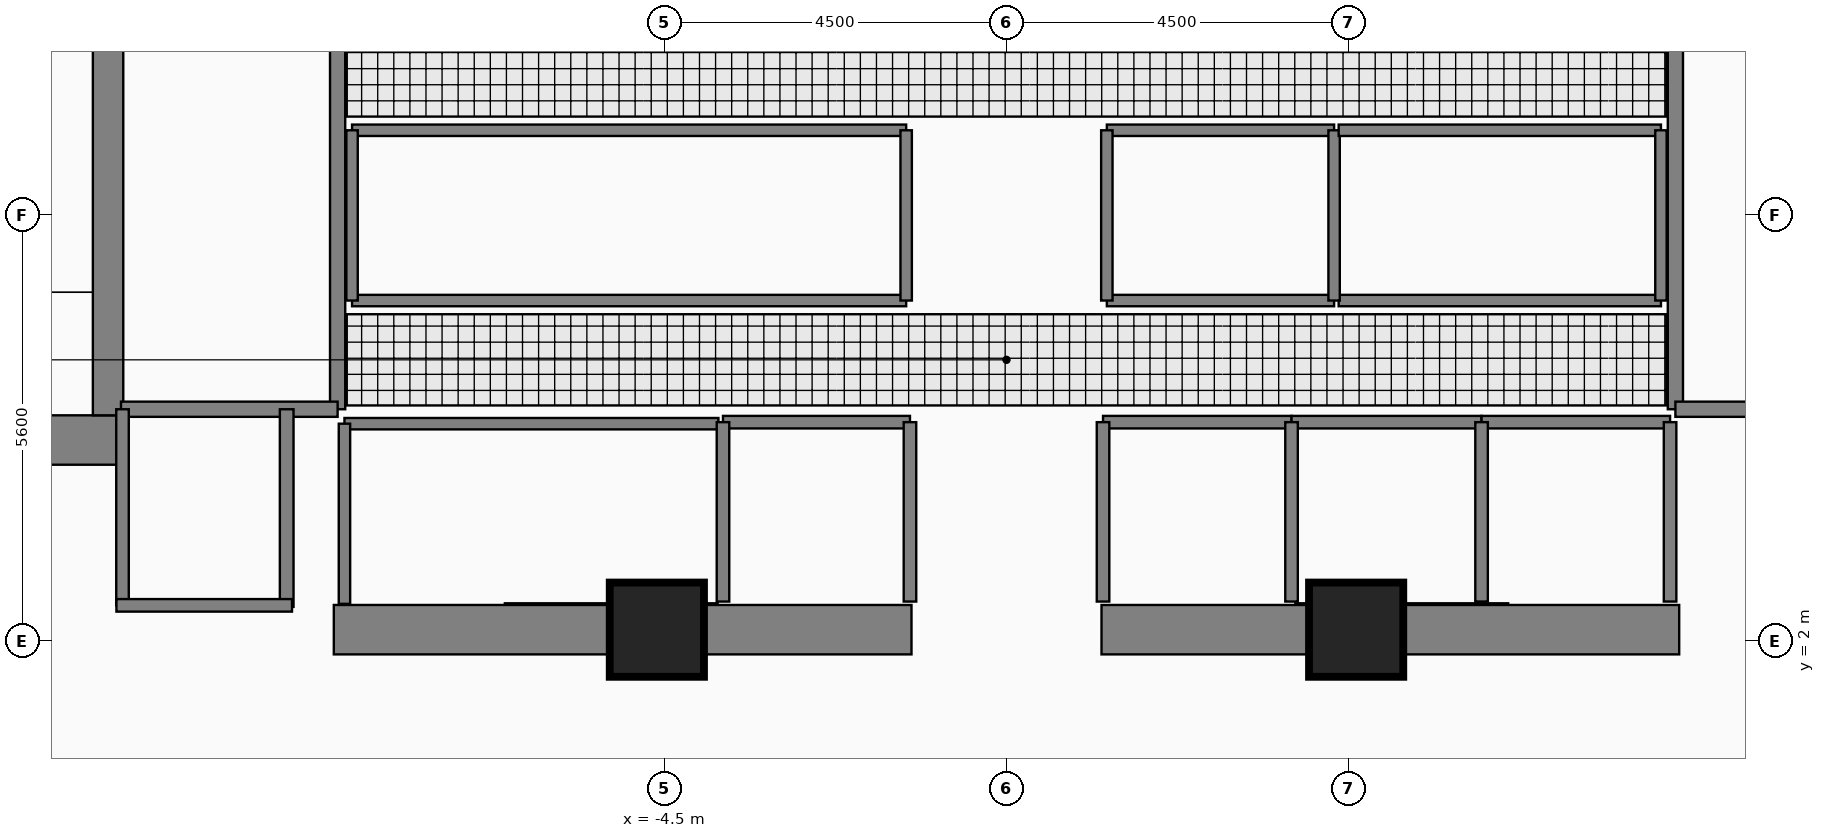
"""IFC4 building model, lengths in metres.
Left out: names, types, materials, properties, quantities, classifications, styles, units other than length and angle.
Written with IfcOpenShell. Run it as: python <this file> out.ifc"""

import sys

from ifc_helpers import new_model, si_unit, direction, frame, frame_2d, origin, origin_2d, place, context, subcontext, project, spatial, rectangle, extrude, element, fill, save


model = new_model("IFC4")
c1 = context("Model", 3, precision=1e-05, world=origin(), true_north=direction((0.0, 1.0)))
c2 = subcontext(c1, "Body", "Model", "MODEL_VIEW")
j1 = project(units=[si_unit("LENGTHUNIT", "METRE"), si_unit("PLANEANGLEUNIT", "RADIAN")], contexts=[c1])
p1 = place(None, origin())
s1 = spatial("IfcSite", under=j1, at=p1, CompositionType="ELEMENT")
p2 = place(p1, origin())
s2 = spatial("IfcBuilding", under=s1, at=p2, CompositionType="ELEMENT")
p3 = place(p2, frame((0.0, 0.0, 168.2)))
s3 = spatial("IfcBuildingStorey", under=s2, at=p3, CompositionType="ELEMENT", Elevation=168.2)
p4 = place(p3, frame((-16.06, 4.645, 0.0), z_axis=(0.0, 0.0, 1.0), x_axis=(1.0, 0.0, 0.0)))
e1 = element("IfcWall", 1, at=p4, inside=s3, PredefinedType="SHEAR", context=c2, shape_type="SweptSolid", body=[
    extrude(rectangle(XDim=4.46, YDim=0.65, at=frame_2d((2.23, 0.0))), origin(), (0.0, 0.0, 1.0), 4.41),
])
for number, where, z_axis, x_axis in (
    (2, (-8.85, 2.15, 0.0), (0.0, 0.0, 1.0), (1.0, 0.0, 0.0)),
    (3, (1.25, 2.15, 0.0), (0.0, 0.0, 1.0), (1.0, 0.0, 0.0)),
):
    element("IfcWall", number, at=place(p3, frame(where, z_axis=z_axis, x_axis=x_axis)), inside=s3, PredefinedType="SHEAR", context=c2, shape_type="SweptSolid", body=[
        extrude(rectangle(XDim=7.6, YDim=0.65, at=frame_2d((3.8, 0.0))), origin(), (0.0, 0.0, 1.0), 4.38),
    ])
p5 = place(p3, frame((-11.82, 4.97, 0.0), z_axis=(0.0, 0.0, 1.0), x_axis=(0.0, 1.0, 0.0)))
e4 = element("IfcWall", 4, at=p5, inside=s3, PredefinedType="SHEAR", context=c2, shape_type="SweptSolid", body=[
    extrude(rectangle(XDim=8.96, YDim=0.4, at=frame_2d((4.48, 0.0))), origin(), (0.0, 0.0, 1.0), 4.41),
])
p6 = place(p5, frame((0.31, 0.0, 0.0)))
e5 = element("IfcOpeningElement", 5, at=p6, cuts=e4, PredefinedType="OPENING", context=c2, shape_type="SweptSolid", body=[
    extrude(rectangle(XDim=1.12, YDim=2.22, at=frame_2d((0.56, 1.11))), frame((0.0, 0.21, 0.0), z_axis=(0.0, -1.0, 0.0), x_axis=(1.0, 0.0, 0.0)), (0.0, 0.0, 1.0), 0.42),
])
for number, where, z_axis, x_axis in (
    (6, (-4.6, 2.15, 0.0), (0.0, 0.0, 1.0), (1.0, 0.0, 0.0)),
    (7, (4.6, 2.15, 0.0), (0.0, 0.0, 1.0), (1.0, 0.0, 0.0)),
):
    element("IfcColumn", number, at=place(p3, frame(where, z_axis=z_axis, x_axis=x_axis)), inside=s3, PredefinedType="COLUMN", context=c2, shape_type="SweptSolid", body=[
        extrude(rectangle(XDim=1.2, YDim=1.2, at=origin_2d()), origin(), (0.0, 0.0, 1.0), 4.6),
    ])
p7 = place(p3, frame((-8.8, 5.05, 0.0), z_axis=(0.0, 0.0, 1.0), x_axis=(0.0, 1.0, 0.0)))
e8 = element("IfcWall", 8, at=p7, inside=s3, PredefinedType="PARTITIONING", context=c2, shape_type="SweptSolid", body=[
    extrude(rectangle(XDim=6.1, YDim=0.2, at=frame_2d((3.05, 0.0))), origin(), (0.0, 0.0, 1.0), 4.38),
])
p8 = place(p7, frame((0.25, 0.0, 0.0)))
e9 = element("IfcOpeningElement", 9, at=p8, cuts=e8, PredefinedType="OPENING", context=c2, shape_type="SweptSolid", body=[
    extrude(rectangle(XDim=1.1, YDim=2.2, at=frame_2d((0.55, 1.1))), frame((0.0, 0.11, 0.0), z_axis=(0.0, -1.0, 0.0), x_axis=(1.0, 0.0, 0.0)), (0.0, 0.0, 1.0), 0.22),
])
p9 = place(p7, frame((3.85, 0.0, 0.0)))
e10 = element("IfcOpeningElement", 10, at=p9, cuts=e8, PredefinedType="OPENING", context=c2, shape_type="SweptSolid", body=[
    extrude(rectangle(XDim=1.1, YDim=2.2, at=frame_2d((0.55, 1.1))), frame((0.0, 0.11, 0.0), z_axis=(0.0, -1.0, 0.0), x_axis=(1.0, 0.0, 0.0)), (0.0, 0.0, 1.0), 0.22),
])
p10 = place(p3, frame((8.8, 11.15, 0.0), z_axis=(0.0, 0.0, 1.0), x_axis=(0.0, -1.0, 0.0)))
e11 = element("IfcWall", 11, at=p10, inside=s3, PredefinedType="PARTITIONING", context=c2, shape_type="SweptSolid", body=[
    extrude(rectangle(XDim=6.1, YDim=0.2, at=frame_2d((3.05, 0.0))), origin(), (0.0, 0.0, 1.0), 4.38),
])
p11 = place(p10, frame((1.15, 0.0, 0.0)))
e12 = element("IfcOpeningElement", 12, at=p11, cuts=e11, PredefinedType="OPENING", context=c2, shape_type="SweptSolid", body=[
    extrude(rectangle(XDim=1.1, YDim=2.2, at=frame_2d((0.55, 1.1))), frame((0.0, 0.11, 0.0), z_axis=(0.0, -1.0, 0.0), x_axis=(1.0, 0.0, 0.0)), (0.0, 0.0, 1.0), 0.22),
])
p12 = place(p10, frame((4.75, 0.0, 0.0)))
e13 = element("IfcOpeningElement", 13, at=p12, cuts=e11, PredefinedType="OPENING", context=c2, shape_type="SweptSolid", body=[
    extrude(rectangle(XDim=1.1, YDim=2.2, at=frame_2d((0.55, 1.1))), frame((0.0, 0.11, 0.0), z_axis=(0.0, -1.0, 0.0), x_axis=(1.0, 0.0, 0.0)), (0.0, 0.0, 1.0), 0.22),
])
p13 = place(p3, frame((-3.73, 4.88, 0.0), z_axis=(0.0, 0.0, 1.0), x_axis=(1.0, 0.0, 0.0)))
e14 = element("IfcWall", 14, at=p13, inside=s3, PredefinedType="PARTITIONING", context=c2, shape_type="SweptSolid", body=[
    extrude(rectangle(XDim=2.46, YDim=0.165, at=frame_2d((1.23, 0.0))), origin(), (0.0, 0.0, 1.0), 4.38),
])
p14 = place(p13, frame((0.68, 0.0, 0.0)))
e15 = element("IfcOpeningElement", 15, at=p14, cuts=e14, PredefinedType="OPENING", context=c2, shape_type="SweptSolid", body=[
    extrude(rectangle(XDim=1.1, YDim=2.25, at=frame_2d((0.55, 1.125))), frame((0.0, 0.093, 0.0), z_axis=(0.0, -1.0, 0.0), x_axis=(1.0, 0.0, 0.0)), (0.0, 0.0, 1.0), 0.185),
])
p15 = place(p3, frame((1.27, 4.88, 0.0), z_axis=(0.0, 0.0, 1.0), x_axis=(1.0, 0.0, 0.0)))
e16 = element("IfcWall", 16, at=p15, inside=s3, PredefinedType="PARTITIONING", context=c2, shape_type="SweptSolid", body=[
    extrude(rectangle(XDim=2.48, YDim=0.165, at=frame_2d((1.24, 0.0))), origin(), (0.0, 0.0, 1.0), 4.38),
])
p16 = place(p15, frame((0.69, 0.0, 0.0)))
e17 = element("IfcOpeningElement", 17, at=p16, cuts=e16, PredefinedType="OPENING", context=c2, shape_type="SweptSolid", body=[
    extrude(rectangle(XDim=1.1, YDim=2.25, at=frame_2d((0.55, 1.125))), frame((0.0, 0.093, 0.0), z_axis=(0.0, -1.0, 0.0), x_axis=(1.0, 0.0, 0.0)), (0.0, 0.0, 1.0), 0.185),
])
p17 = place(p3, frame((3.75, 4.88, 0.0), z_axis=(0.0, 0.0, 1.0), x_axis=(1.0, 0.0, 0.0)))
e18 = element("IfcWall", 18, at=p17, inside=s3, PredefinedType="PARTITIONING", context=c2, shape_type="SweptSolid", body=[
    extrude(rectangle(XDim=2.5, YDim=0.165, at=frame_2d((1.25, 0.0))), origin(), (0.0, 0.0, 1.0), 4.38),
])
p18 = place(p17, frame((0.7, 0.0, 0.0)))
e19 = element("IfcOpeningElement", 19, at=p18, cuts=e18, PredefinedType="OPENING", context=c2, shape_type="SweptSolid", body=[
    extrude(rectangle(XDim=1.1, YDim=2.25, at=frame_2d((0.55, 1.125))), frame((0.0, 0.093, 0.0), z_axis=(0.0, -1.0, 0.0), x_axis=(1.0, 0.0, 0.0)), (0.0, 0.0, 1.0), 0.185),
])
p19 = place(p3, frame((6.25, 4.88, 0.0), z_axis=(0.0, 0.0, 1.0), x_axis=(1.0, 0.0, 0.0)))
e20 = element("IfcWall", 20, at=p19, inside=s3, PredefinedType="PARTITIONING", context=c2, shape_type="SweptSolid", body=[
    extrude(rectangle(XDim=2.48, YDim=0.165, at=frame_2d((1.24, 0.0))), origin(), (0.0, 0.0, 1.0), 4.38),
])
p20 = place(p19, frame((0.69, 0.0, 0.0)))
e21 = element("IfcOpeningElement", 21, at=p20, cuts=e20, PredefinedType="OPENING", context=c2, shape_type="SweptSolid", body=[
    extrude(rectangle(XDim=1.1, YDim=2.25, at=frame_2d((0.55, 1.125))), frame((0.0, 0.093, 0.0), z_axis=(0.0, -1.0, 0.0), x_axis=(1.0, 0.0, 0.0)), (0.0, 0.0, 1.0), 0.185),
])
p21 = place(p3, frame((-8.71, 4.86, 0.0), z_axis=(0.0, 0.0, 1.0), x_axis=(1.0, 0.0, 0.0)))
e22 = element("IfcWall", 22, at=p21, inside=s3, PredefinedType="PARTITIONING", context=c2, shape_type="SweptSolid", body=[
    extrude(rectangle(XDim=4.92, YDim=0.15, at=frame_2d((2.46, 0.0))), origin(), (0.0, 0.0, 1.0), 4.38),
])
p22 = place(p21, frame((2.01, 0.0, 0.0)))
e23 = element("IfcOpeningElement", 23, at=p22, cuts=e22, PredefinedType="OPENING", context=c2, shape_type="SweptSolid", body=[
    extrude(rectangle(XDim=0.9, YDim=2.15, at=frame_2d((0.45, 1.075))), frame((0.0, 0.085, 0.0), z_axis=(0.0, -1.0, 0.0), x_axis=(1.0, 0.0, 0.0)), (0.0, 0.0, 1.0), 0.17),
])
p23 = place(p3, frame((-8.61, 6.48, 0.0), z_axis=(0.0, 0.0, 1.0), x_axis=(1.0, 0.0, 0.0)))
e24 = element("IfcWall", 24, at=p23, inside=s3, PredefinedType="PARTITIONING", context=c2, shape_type="SweptSolid", body=[
    extrude(rectangle(XDim=7.29, YDim=0.15, at=frame_2d((3.645, 0.0))), origin(), (0.0, 0.0, 1.0), 4.38),
])
p24 = place(p23, frame((3.195, 0.0, 0.0)))
e25 = element("IfcOpeningElement", 25, at=p24, cuts=e24, PredefinedType="OPENING", context=c2, shape_type="SweptSolid", body=[
    extrude(rectangle(XDim=0.9, YDim=2.15, at=frame_2d((0.45, 1.075))), frame((0.0, 0.085, 0.0), z_axis=(0.0, -1.0, 0.0), x_axis=(1.0, 0.0, 0.0)), (0.0, 0.0, 1.0), 0.17),
])
p25 = place(p3, frame((1.32, 8.72, 0.0), z_axis=(0.0, 0.0, 1.0), x_axis=(1.0, 0.0, 0.0)))
e26 = element("IfcWall", 26, at=p25, inside=s3, PredefinedType="PARTITIONING", context=c2, shape_type="SweptSolid", body=[
    extrude(rectangle(XDim=2.99, YDim=0.15, at=frame_2d((1.495, 0.0))), origin(), (0.0, 0.0, 1.0), 4.38),
])
p26 = place(p25, frame((1.045, 0.0, 0.0)))
e27 = element("IfcOpeningElement", 27, at=p26, cuts=e26, PredefinedType="OPENING", context=c2, shape_type="SweptSolid", body=[
    extrude(rectangle(XDim=0.9, YDim=2.15, at=frame_2d((0.45, 1.075))), frame((0.0, 0.085, 0.0), z_axis=(0.0, -1.0, 0.0), x_axis=(1.0, 0.0, 0.0)), (0.0, 0.0, 1.0), 0.17),
])
p27 = place(p3, frame((4.37, 6.48, 0.0), z_axis=(0.0, 0.0, 1.0), x_axis=(1.0, 0.0, 0.0)))
e28 = element("IfcWall", 28, at=p27, inside=s3, PredefinedType="PARTITIONING", context=c2, shape_type="SweptSolid", body=[
    extrude(rectangle(XDim=4.24, YDim=0.15, at=frame_2d((2.12, 0.0))), origin(), (0.0, 0.0, 1.0), 4.38),
])
p28 = place(p27, frame((1.67, 0.0, 0.0)))
e29 = element("IfcOpeningElement", 29, at=p28, cuts=e28, PredefinedType="OPENING", context=c2, shape_type="SweptSolid", body=[
    extrude(rectangle(XDim=0.9, YDim=2.15, at=frame_2d((0.45, 1.075))), frame((0.0, 0.085, 0.0), z_axis=(0.0, -1.0, 0.0), x_axis=(1.0, 0.0, 0.0)), (0.0, 0.0, 1.0), 0.17),
])
for number, where, z_axis, x_axis in (
    (30, (-11.65, 5.05, 0.0), (0.0, 0.0, 1.0), (1.0, 0.0, 0.0)),
    (31, (8.8, 5.05, 0.0), (0.0, 0.0, 1.0), (1.0, 0.0, 0.0)),
):
    element("IfcWall", number, at=place(p3, frame(where, z_axis=z_axis, x_axis=x_axis)), inside=s3, PredefinedType="PARTITIONING", context=c2, shape_type="SweptSolid", body=[
        extrude(rectangle(XDim=2.85, YDim=0.2, at=frame_2d((1.425, 0.0))), origin(), (0.0, 0.0, 1.0), 4.38),
    ])
for number, where, z_axis, x_axis in (
    (32, (-3.73, 2.52, 0.0), (0.0, 0.0, 1.0), (0.0, 1.0, 0.0)),
    (33, (-1.27, 2.52, 0.0), (0.0, 0.0, 1.0), (0.0, 1.0, 0.0)),
    (34, (1.27, 2.52, 0.0), (0.0, 0.0, 1.0), (0.0, 1.0, 0.0)),
    (35, (3.75, 2.52, 0.0), (0.0, 0.0, 1.0), (0.0, 1.0, 0.0)),
    (36, (6.25, 2.52, 0.0), (0.0, 0.0, 1.0), (0.0, 1.0, 0.0)),
    (37, (8.73, 2.52, 0.0), (0.0, 0.0, 1.0), (0.0, 1.0, 0.0)),
):
    element("IfcWall", number, at=place(p3, frame(where, z_axis=z_axis, x_axis=x_axis)), inside=s3, PredefinedType="PARTITIONING", context=c2, shape_type="SweptSolid", body=[
        extrude(rectangle(XDim=2.36, YDim=0.165, at=frame_2d((1.18, 0.0))), origin(), (0.0, 0.0, 1.0), 4.38),
    ])
p29 = place(p3, frame((-8.71, 2.49, 0.0), z_axis=(0.0, 0.0, 1.0), x_axis=(0.0, 1.0, 0.0)))
e38 = element("IfcWall", 38, at=p29, inside=s3, PredefinedType="PARTITIONING", context=c2, shape_type="SweptSolid", body=[
    extrude(rectangle(XDim=2.37, YDim=0.15, at=frame_2d((1.185, 0.0))), origin(), (0.0, 0.0, 1.0), 4.38),
])
p30 = place(p3, frame((-9.47, 2.45, 0.0), z_axis=(0.0, 0.0, 1.0), x_axis=(0.0, 1.0, 0.0)))
e39 = element("IfcWall", 39, at=p30, inside=s3, PredefinedType="PARTITIONING", context=c2, shape_type="SweptSolid", body=[
    extrude(rectangle(XDim=2.6, YDim=0.18, at=frame_2d((1.3, 0.0))), origin(), (0.0, 0.0, 1.0), 4.38),
])
p31 = place(p3, frame((-11.63, 2.47, 0.0), z_axis=(0.0, 0.0, 1.0), x_axis=(0.0, 1.0, 0.0)))
e40 = element("IfcWall", 40, at=p31, inside=s3, PredefinedType="PARTITIONING", context=c2, shape_type="SweptSolid", body=[
    extrude(rectangle(XDim=2.58, YDim=0.165, at=frame_2d((1.29, 0.0))), origin(), (0.0, 0.0, 1.0), 4.38),
])
p32 = place(p3, frame((-11.71, 2.47, 0.0), z_axis=(0.0, 0.0, 1.0), x_axis=(1.0, 0.0, 0.0)))
e41 = element("IfcWall", 41, at=p32, inside=s3, PredefinedType="PARTITIONING", context=c2, shape_type="SweptSolid", body=[
    extrude(rectangle(XDim=2.31, YDim=0.165, at=frame_2d((1.155, 0.0))), origin(), (0.0, 0.0, 1.0), 3.28),
])
p33 = place(p3, frame((-8.61, 8.72, 0.0), z_axis=(0.0, 0.0, 1.0), x_axis=(1.0, 0.0, 0.0)))
e42 = element("IfcWall", 42, at=p33, inside=s3, PredefinedType="PARTITIONING", context=c2, shape_type="SweptSolid", body=[
    extrude(rectangle(XDim=7.29, YDim=0.15, at=frame_2d((3.645, 0.0))), origin(), (0.0, 0.0, 1.0), 4.38),
])
for number, where, z_axis, x_axis in (
    (43, (-8.61, 6.48, 0.0), (0.0, 0.0, 1.0), (0.0, 1.0, 0.0)),
    (44, (-1.32, 6.48, 0.0), (0.0, 0.0, 1.0), (0.0, 1.0, 0.0)),
):
    element("IfcWall", number, at=place(p3, frame(where, z_axis=z_axis, x_axis=x_axis)), inside=s3, PredefinedType="PARTITIONING", context=c2, shape_type="SweptSolid", body=[
        extrude(rectangle(XDim=2.24, YDim=0.15, at=frame_2d((1.12, 0.0))), origin(), (0.0, 0.0, 1.0), 4.38),
    ])
p34 = place(p3, frame((1.32, 6.48, 0.0), z_axis=(0.0, 0.0, 1.0), x_axis=(1.0, 0.0, 0.0)))
e45 = element("IfcWall", 45, at=p34, inside=s3, PredefinedType="PARTITIONING", context=c2, shape_type="SweptSolid", body=[
    extrude(rectangle(XDim=2.99, YDim=0.15, at=frame_2d((1.495, 0.0))), origin(), (0.0, 0.0, 1.0), 4.38),
])
for number, where, z_axis, x_axis in (
    (46, (1.32, 6.48, 0.0), (0.0, 0.0, 1.0), (0.0, 1.0, 0.0)),
    (47, (4.31, 6.48, 0.0), (0.0, 0.0, 1.0), (0.0, 1.0, 0.0)),
):
    element("IfcWall", number, at=place(p3, frame(where, z_axis=z_axis, x_axis=x_axis)), inside=s3, PredefinedType="PARTITIONING", context=c2, shape_type="SweptSolid", body=[
        extrude(rectangle(XDim=2.24, YDim=0.15, at=frame_2d((1.12, 0.0))), origin(), (0.0, 0.0, 1.0), 4.38),
    ])
p35 = place(p3, frame((4.37, 8.72, 0.0), z_axis=(0.0, 0.0, 1.0), x_axis=(1.0, 0.0, 0.0)))
e48 = element("IfcWall", 48, at=p35, inside=s3, PredefinedType="PARTITIONING", context=c2, shape_type="SweptSolid", body=[
    extrude(rectangle(XDim=4.24, YDim=0.15, at=frame_2d((2.12, 0.0))), origin(), (0.0, 0.0, 1.0), 4.38),
])
p36 = place(p3, frame((8.61, 6.48, 0.0), z_axis=(0.0, 0.0, 1.0), x_axis=(0.0, 1.0, 0.0)))
e49 = element("IfcWall", 49, at=p36, inside=s3, PredefinedType="PARTITIONING", context=c2, shape_type="SweptSolid", body=[
    extrude(rectangle(XDim=2.24, YDim=0.15, at=frame_2d((1.12, 0.0))), origin(), (0.0, 0.0, 1.0), 4.38),
])
p37 = place(p6, origin())
e50 = element("IfcDoor", 50, at=p37, inside=s3, OperationType="SINGLE_SWING_LEFT", PredefinedType="DOOR", context=c2, shape_type="SweptSolid", body=[
    extrude(rectangle(XDim=1.12, YDim=2.22, at=frame_2d((0.56, 1.11))), frame((0.0, 0.025, 0.0), z_axis=(0.0, -1.0, 0.0), x_axis=(1.0, 0.0, 0.0)), (0.0, 0.0, 1.0), 0.05),
])
fill(e5, e50)
p38 = place(p8, origin())
e51 = element("IfcDoor", 51, at=p38, inside=s3, OperationType="SINGLE_SWING_LEFT", PredefinedType="DOOR", context=c2, shape_type="SweptSolid", body=[
    extrude(rectangle(XDim=1.1, YDim=2.2, at=frame_2d((0.55, 1.1))), frame((0.0, 0.025, 0.0), z_axis=(0.0, -1.0, 0.0), x_axis=(1.0, 0.0, 0.0)), (0.0, 0.0, 1.0), 0.05),
])
fill(e9, e51)
p39 = place(p9, origin())
e52 = element("IfcDoor", 52, at=p39, inside=s3, OperationType="SINGLE_SWING_RIGHT", PredefinedType="DOOR", context=c2, shape_type="SweptSolid", body=[
    extrude(rectangle(XDim=1.1, YDim=2.2, at=frame_2d((0.55, 1.1))), frame((0.0, 0.025, 0.0), z_axis=(0.0, -1.0, 0.0), x_axis=(1.0, 0.0, 0.0)), (0.0, 0.0, 1.0), 0.05),
])
fill(e10, e52)
p40 = place(p11, origin())
e53 = element("IfcDoor", 53, at=p40, inside=s3, OperationType="SINGLE_SWING_LEFT", PredefinedType="DOOR", context=c2, shape_type="SweptSolid", body=[
    extrude(rectangle(XDim=1.1, YDim=2.2, at=frame_2d((0.55, 1.1))), frame((0.0, 0.025, 0.0), z_axis=(0.0, -1.0, 0.0), x_axis=(1.0, 0.0, 0.0)), (0.0, 0.0, 1.0), 0.05),
])
fill(e12, e53)
p41 = place(p12, origin())
e54 = element("IfcDoor", 54, at=p41, inside=s3, OperationType="SINGLE_SWING_RIGHT", PredefinedType="DOOR", context=c2, shape_type="SweptSolid", body=[
    extrude(rectangle(XDim=1.1, YDim=2.2, at=frame_2d((0.55, 1.1))), frame((0.0, 0.025, 0.0), z_axis=(0.0, -1.0, 0.0), x_axis=(1.0, 0.0, 0.0)), (0.0, 0.0, 1.0), 0.05),
])
fill(e13, e54)
p42 = place(p14, origin())
e55 = element("IfcDoor", 55, at=p42, inside=s3, OperationType="SLIDING_TO_LEFT", PredefinedType="DOOR", context=c2, shape_type="SweptSolid", body=[
    extrude(rectangle(XDim=1.1, YDim=2.25, at=frame_2d((0.55, 1.125))), frame((0.0, 0.025, 0.0), z_axis=(0.0, -1.0, 0.0), x_axis=(1.0, 0.0, 0.0)), (0.0, 0.0, 1.0), 0.05),
])
fill(e15, e55)
p43 = place(p16, origin())
e56 = element("IfcDoor", 56, at=p43, inside=s3, OperationType="SLIDING_TO_LEFT", PredefinedType="DOOR", context=c2, shape_type="SweptSolid", body=[
    extrude(rectangle(XDim=1.1, YDim=2.25, at=frame_2d((0.55, 1.125))), frame((0.0, 0.025, 0.0), z_axis=(0.0, -1.0, 0.0), x_axis=(1.0, 0.0, 0.0)), (0.0, 0.0, 1.0), 0.05),
])
fill(e17, e56)
p44 = place(p18, origin())
e57 = element("IfcDoor", 57, at=p44, inside=s3, OperationType="SLIDING_TO_LEFT", PredefinedType="DOOR", context=c2, shape_type="SweptSolid", body=[
    extrude(rectangle(XDim=1.1, YDim=2.25, at=frame_2d((0.55, 1.125))), frame((0.0, 0.025, 0.0), z_axis=(0.0, -1.0, 0.0), x_axis=(1.0, 0.0, 0.0)), (0.0, 0.0, 1.0), 0.05),
])
fill(e19, e57)
p45 = place(p20, origin())
e58 = element("IfcDoor", 58, at=p45, inside=s3, OperationType="SLIDING_TO_LEFT", PredefinedType="DOOR", context=c2, shape_type="SweptSolid", body=[
    extrude(rectangle(XDim=1.1, YDim=2.25, at=frame_2d((0.55, 1.125))), frame((0.0, 0.025, 0.0), z_axis=(0.0, -1.0, 0.0), x_axis=(1.0, 0.0, 0.0)), (0.0, 0.0, 1.0), 0.05),
])
fill(e21, e58)
p46 = place(p22, origin())
e59 = element("IfcDoor", 59, at=p46, inside=s3, OperationType="SINGLE_SWING_LEFT", PredefinedType="DOOR", context=c2, shape_type="SweptSolid", body=[
    extrude(rectangle(XDim=0.9, YDim=2.15, at=frame_2d((0.45, 1.075))), frame((0.0, 0.025, 0.0), z_axis=(0.0, -1.0, 0.0), x_axis=(1.0, 0.0, 0.0)), (0.0, 0.0, 1.0), 0.05),
])
fill(e23, e59)
p47 = place(p24, origin())
e60 = element("IfcDoor", 60, at=p47, inside=s3, OperationType="SINGLE_SWING_LEFT", PredefinedType="DOOR", context=c2, shape_type="SweptSolid", body=[
    extrude(rectangle(XDim=0.9, YDim=2.15, at=frame_2d((0.45, 1.075))), frame((0.0, 0.025, 0.0), z_axis=(0.0, -1.0, 0.0), x_axis=(1.0, 0.0, 0.0)), (0.0, 0.0, 1.0), 0.05),
])
fill(e25, e60)
p48 = place(p26, origin())
e61 = element("IfcDoor", 61, at=p48, inside=s3, OperationType="SINGLE_SWING_RIGHT", PredefinedType="DOOR", context=c2, shape_type="SweptSolid", body=[
    extrude(rectangle(XDim=0.9, YDim=2.15, at=frame_2d((0.45, 1.075))), frame((0.0, 0.025, 0.0), z_axis=(0.0, -1.0, 0.0), x_axis=(1.0, 0.0, 0.0)), (0.0, 0.0, 1.0), 0.05),
])
fill(e27, e61)
p49 = place(p28, origin())
e62 = element("IfcDoor", 62, at=p49, inside=s3, OperationType="SINGLE_SWING_LEFT", PredefinedType="DOOR", context=c2, shape_type="SweptSolid", body=[
    extrude(rectangle(XDim=0.9, YDim=2.15, at=frame_2d((0.45, 1.075))), frame((0.0, 0.025, 0.0), z_axis=(0.0, -1.0, 0.0), x_axis=(1.0, 0.0, 0.0)), (0.0, 0.0, 1.0), 0.05),
])
fill(e29, e62)
save(model, sys.argv[1])
